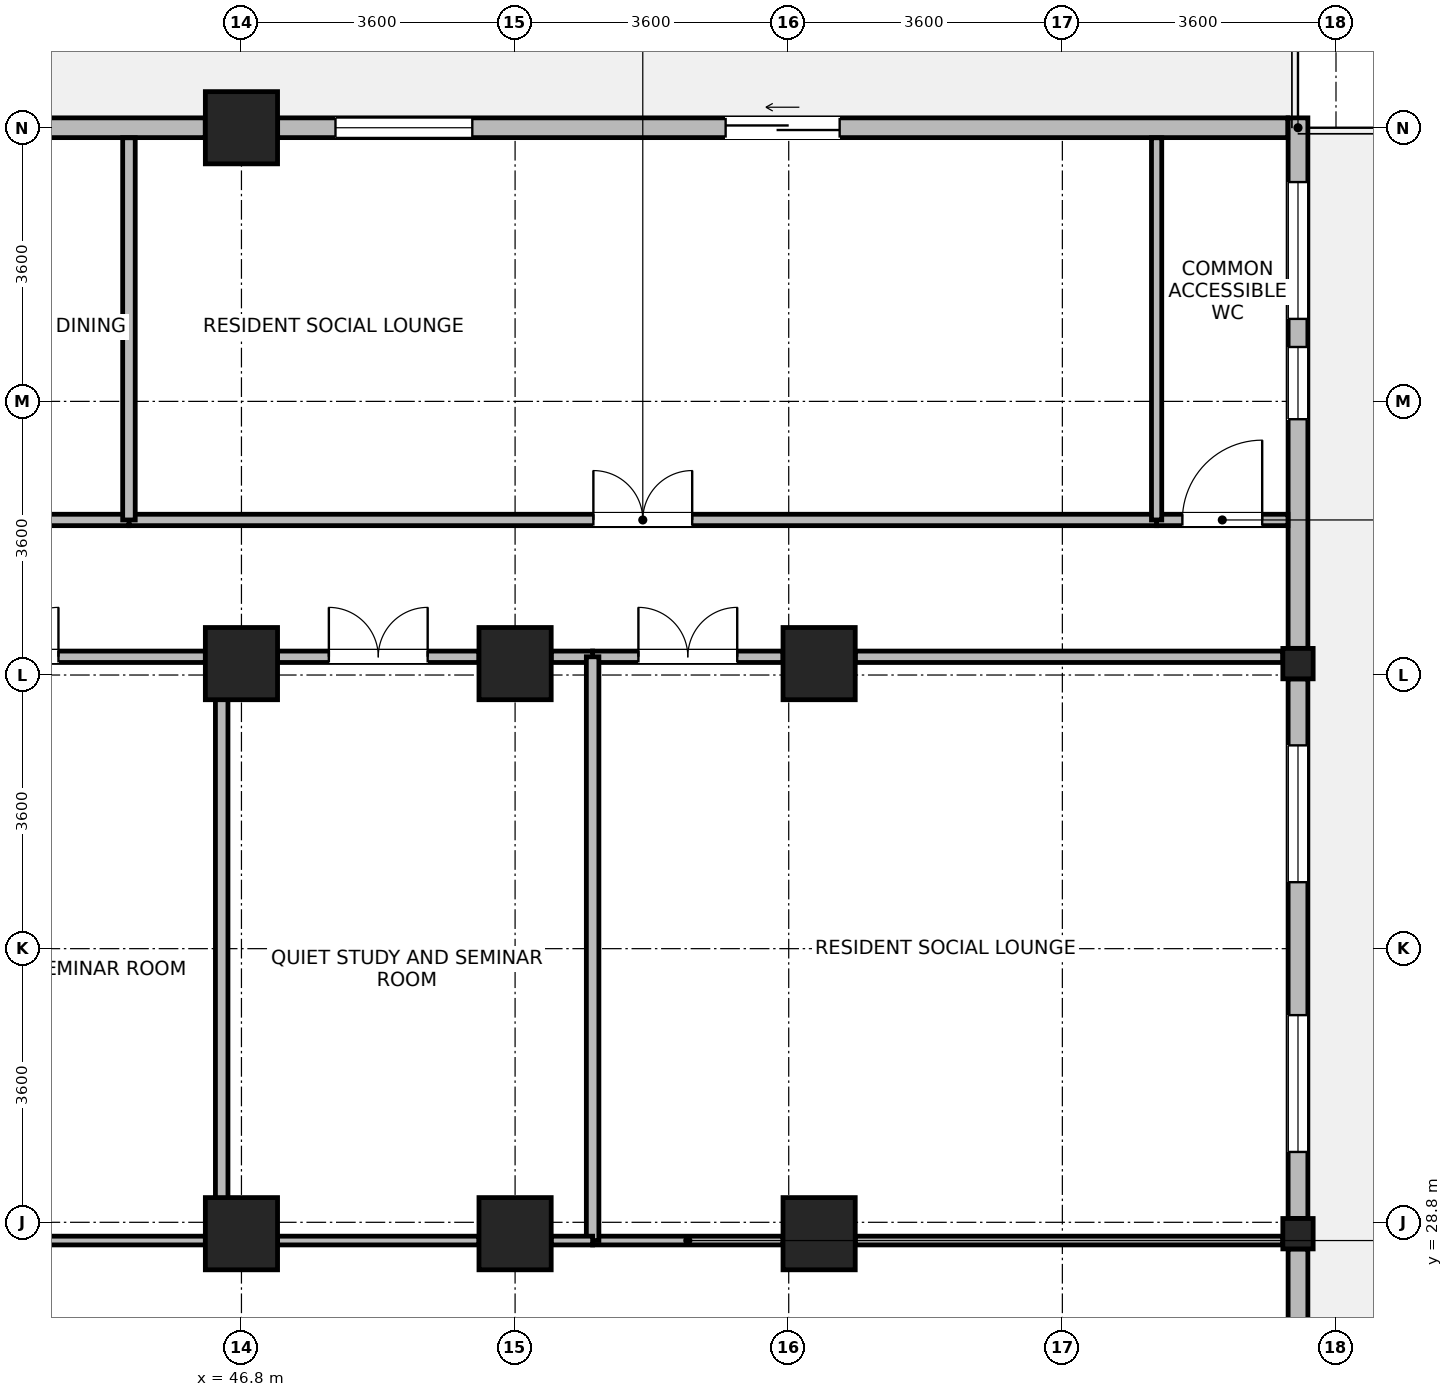
"""IFC4 building model, lengths in metres.
Left out: names, types, materials, properties, quantities, classifications, styles, units other than length and angle.
Written with IfcOpenShell. Run it as: python <this file> out.ifc"""

import sys

from ifc_helpers import new_model, si_unit, direction, frame, frame_2d, origin, origin_2d, place, context, subcontext, project, spatial, rectangle, i_section, extrude, source, transform, mapped, element, fill, save


model = new_model("IFC4")
c1 = context("Model", 3, precision=1e-05, world=origin(), true_north=direction((0.0, 1.0)))
c2 = subcontext(c1, "Body", "Model", "MODEL_VIEW")
j1 = project(units=[si_unit("LENGTHUNIT", "METRE"), si_unit("PLANEANGLEUNIT", "RADIAN")], contexts=[c1])
p1 = place(None, origin())
s1 = spatial("IfcSite", under=j1, at=p1, CompositionType="ELEMENT")
p2 = place(p1, origin())
s2 = spatial("IfcBuilding", under=s1, at=p2, CompositionType="ELEMENT")
p3 = place(p2, frame((0.0, 0.0, 212.9)))
s3 = spatial("IfcBuildingStorey", under=s2, at=p3, CompositionType="ELEMENT", Elevation=212.9)
m1 = source(origin(), c2, "Body", "SweptSolid", [
    extrude(rectangle(XDim=0.95, YDim=0.95, at=origin_2d()), origin(), (0.0, 0.0, 1.0), 3.7),
])
for number, where, z_axis, x_axis in (
    (1, (46.8, 28.65, 0.0), (0.0, 0.0, 1.0), (1.0, 0.0, 0.0)),
    (2, (46.8, 36.15, 0.0), (0.0, 0.0, 1.0), (1.0, 0.0, 0.0)),
    (3, (46.8, 43.2, 0.0), (0.0, 0.0, 1.0), (1.0, 0.0, 0.0)),
    (4, (50.4, 28.65, 0.0), (0.0, 0.0, 1.0), (1.0, 0.0, 0.0)),
    (5, (50.4, 36.15, 0.0), (0.0, 0.0, 1.0), (1.0, 0.0, 0.0)),
    (6, (54.4, 28.65, 0.0), (0.0, 0.0, 1.0), (1.0, 0.0, 0.0)),
    (7, (54.4, 36.15, 0.0), (0.0, 0.0, 1.0), (1.0, 0.0, 0.0)),
):
    element("IfcColumn", number, at=place(p3, frame(where, z_axis=z_axis, x_axis=x_axis)), inside=s3, PredefinedType="COLUMN", context=c2, shape_type="MappedRepresentation", body=[
        mapped(m1, transform((0.0, 0.0, 0.0), x_axis=(1.0, 0.0, 0.0), y_axis=(0.0, 1.0, 0.0), z_axis=(0.0, 0.0, 1.0), scale=1.0)),
    ])
m2 = source(origin(), c2, "Body", "SweptSolid", [
    extrude(i_section(OverallWidth=0.399, OverallDepth=0.4, WebThickness=0.017, FlangeThickness=0.023, FilletRadius=0.015, at=origin_2d()), origin(), (0.0, 0.0, 1.0), 3.7),
])
for number, where, z_axis, x_axis in (
    (8, (60.7, 28.65, 0.0), (0.0, 0.0, 1.0), (1.0, 0.0, 0.0)),
    (9, (60.7, 36.15, 0.0), (0.0, 0.0, 1.0), (1.0, 0.0, 0.0)),
):
    element("IfcColumn", number, at=place(p3, frame(where, z_axis=z_axis, x_axis=x_axis)), inside=s3, PredefinedType="COLUMN", context=c2, shape_type="MappedRepresentation", body=[
        mapped(m2, transform((0.0, 0.0, 0.0), x_axis=(1.0, 0.0, 0.0), y_axis=(0.0, 1.0, 0.0), z_axis=(0.0, 0.0, 1.0), scale=1.0)),
    ])
p4 = place(p3, frame((60.7, 28.449, 0.0), z_axis=(0.0, 0.0, 1.0), x_axis=(0.0, -1.0, 0.0)))
e10 = element("IfcWall", 10, at=p4, inside=s3, PredefinedType="STANDARD", context=c2, shape_type="SweptSolid", body=[
    extrude(rectangle(XDim=6.648, YDim=0.26, at=frame_2d((3.324, 0.0))), origin(), (0.0, 0.0, 1.0), 3.05),
])
p5 = place(p4, frame((4.086, 0.0, 0.85)))
e11 = element("IfcOpeningElement", 11, at=p5, cuts=e10, PredefinedType="OPENING", context=c2, shape_type="SweptSolid", body=[
    extrude(rectangle(XDim=1.8, YDim=1.85, at=frame_2d((0.9, 0.925))), frame((0.0, 0.14, 0.0), z_axis=(0.0, -1.0, 0.0), x_axis=(1.0, 0.0, 0.0)), (0.0, 0.0, 1.0), 0.28),
])
p6 = place(p4, frame((2.317, 0.0, 0.85)))
e12 = element("IfcOpeningElement", 12, at=p6, cuts=e10, PredefinedType="OPENING", context=c2, shape_type="SweptSolid", body=[
    extrude(rectangle(XDim=0.95, YDim=1.75, at=frame_2d((0.475, 0.875))), frame((0.0, 0.14, 0.0), z_axis=(0.0, -1.0, 0.0), x_axis=(1.0, 0.0, 0.0)), (0.0, 0.0, 1.0), 0.28),
])
p7 = place(p3, frame((60.7, 35.949, 0.0), z_axis=(0.0, 0.0, 1.0), x_axis=(0.0, -1.0, 0.0)))
e13 = element("IfcWall", 13, at=p7, inside=s3, PredefinedType="STANDARD", context=c2, shape_type="SweptSolid", body=[
    extrude(rectangle(XDim=7.098, YDim=0.26, at=frame_2d((3.549, 0.0))), origin(), (0.0, 0.0, 1.0), 3.05),
])
p8 = place(p7, frame((0.875, 0.0, 0.85)))
e14 = element("IfcOpeningElement", 14, at=p8, cuts=e13, PredefinedType="OPENING", context=c2, shape_type="SweptSolid", body=[
    extrude(rectangle(XDim=1.8, YDim=1.85, at=frame_2d((0.9, 0.925))), frame((0.0, 0.14, 0.0), z_axis=(0.0, -1.0, 0.0), x_axis=(1.0, 0.0, 0.0)), (0.0, 0.0, 1.0), 0.28),
])
p9 = place(p7, frame((4.424, 0.0, 0.85)))
e15 = element("IfcOpeningElement", 15, at=p9, cuts=e13, PredefinedType="OPENING", context=c2, shape_type="SweptSolid", body=[
    extrude(rectangle(XDim=1.8, YDim=1.85, at=frame_2d((0.9, 0.925))), frame((0.0, 0.14, 0.0), z_axis=(0.0, -1.0, 0.0), x_axis=(1.0, 0.0, 0.0)), (0.0, 0.0, 1.0), 0.28),
])
p10 = place(p3, frame((60.7, 43.33, 0.0), z_axis=(0.0, 0.0, 1.0), x_axis=(0.0, -1.0, 0.0)))
e16 = element("IfcWall", 16, at=p10, inside=s3, PredefinedType="STANDARD", context=c2, shape_type="SweptSolid", body=[
    extrude(rectangle(XDim=6.979, YDim=0.26, at=frame_2d((3.49, 0.0))), origin(), (0.0, 0.0, 1.0), 3.45),
])
p11 = place(p10, frame((0.845, 0.0, 0.85)))
e17 = element("IfcOpeningElement", 17, at=p11, cuts=e16, PredefinedType="OPENING", context=c2, shape_type="SweptSolid", body=[
    extrude(rectangle(XDim=1.8, YDim=1.85, at=frame_2d((0.9, 0.925))), frame((0.0, 0.14, 0.0), z_axis=(0.0, -1.0, 0.0), x_axis=(1.0, 0.0, 0.0)), (0.0, 0.0, 1.0), 0.28),
])
p12 = place(p10, frame((3.014, 0.0, 0.85)))
e18 = element("IfcOpeningElement", 18, at=p12, cuts=e16, PredefinedType="OPENING", context=c2, shape_type="SweptSolid", body=[
    extrude(rectangle(XDim=0.95, YDim=1.75, at=frame_2d((0.475, 0.875))), frame((0.0, 0.14, 0.0), z_axis=(0.0, -1.0, 0.0), x_axis=(1.0, 0.0, 0.0)), (0.0, 0.0, 1.0), 0.28),
])
p13 = place(p3, frame((47.276, 43.2, 0.0), z_axis=(0.0, 0.0, 1.0), x_axis=(1.0, 0.0, 0.0)))
e19 = element("IfcWall", 19, at=p13, inside=s3, PredefinedType="STANDARD", context=c2, shape_type="SweptSolid", body=[
    extrude(rectangle(XDim=13.289, YDim=0.26, at=frame_2d((6.645, 0.0))), origin(), (0.0, 0.0, 1.0), 3.45),
])
p14 = place(p13, frame((5.894, 0.0, 0.0)))
e20 = element("IfcOpeningElement", 20, at=p14, cuts=e19, PredefinedType="OPENING", context=c2, shape_type="SweptSolid", body=[
    extrude(rectangle(XDim=1.5, YDim=2.15, at=frame_2d((0.75, 1.075))), frame((0.0, 0.14, 0.0), z_axis=(0.0, -1.0, 0.0), x_axis=(1.0, 0.0, 0.0)), (0.0, 0.0, 1.0), 0.28),
])
p15 = place(p13, frame((0.761, 0.0, 0.85)))
e21 = element("IfcOpeningElement", 21, at=p15, cuts=e19, PredefinedType="OPENING", context=c2, shape_type="SweptSolid", body=[
    extrude(rectangle(XDim=1.8, YDim=1.85, at=frame_2d((0.9, 0.925))), frame((0.0, 0.14, 0.0), z_axis=(0.0, -1.0, 0.0), x_axis=(1.0, 0.0, 0.0)), (0.0, 0.0, 1.0), 0.28),
])
p16 = place(p3, frame((36.476, 43.2, 0.0), z_axis=(0.0, 0.0, 1.0), x_axis=(1.0, 0.0, 0.0)))
e22 = element("IfcWall", 22, at=p16, inside=s3, PredefinedType="STANDARD", context=c2, shape_type="SweptSolid", body=[
    extrude(rectangle(XDim=9.848, YDim=0.26, at=frame_2d((4.924, 0.0))), origin(), (0.0, 0.0, 1.0), 3.05),
])
p17 = place(p16, frame((0.741, 0.0, 0.85)))
e23 = element("IfcOpeningElement", 23, at=p17, cuts=e22, PredefinedType="OPENING", context=c2, shape_type="SweptSolid", body=[
    extrude(rectangle(XDim=1.8, YDim=1.85, at=frame_2d((0.9, 0.925))), frame((0.0, 0.14, 0.0), z_axis=(0.0, -1.0, 0.0), x_axis=(1.0, 0.0, 0.0)), (0.0, 0.0, 1.0), 0.28),
])
p18 = place(p16, frame((4.024, 0.0, 0.85)))
e24 = element("IfcOpeningElement", 24, at=p18, cuts=e22, PredefinedType="OPENING", context=c2, shape_type="SweptSolid", body=[
    extrude(rectangle(XDim=1.8, YDim=1.85, at=frame_2d((0.9, 0.925))), frame((0.0, 0.14, 0.0), z_axis=(0.0, -1.0, 0.0), x_axis=(1.0, 0.0, 0.0)), (0.0, 0.0, 1.0), 0.28),
])
p19 = place(p3, frame((45.32, 38.04, 0.0), z_axis=(0.0, 0.0, 1.0), x_axis=(1.0, 0.0, 0.0)))
e25 = element("IfcWall", 25, at=p19, inside=s3, PredefinedType="PARTITIONING", context=c2, shape_type="SweptSolid", body=[
    extrude(rectangle(XDim=13.52, YDim=0.15, at=frame_2d((6.76, 0.0))), origin(), (0.0, 0.0, 1.0), 3.45),
])
p20 = place(p19, frame((6.11, 0.0, 0.0)))
e26 = element("IfcOpeningElement", 26, at=p20, cuts=e25, PredefinedType="OPENING", context=c2, shape_type="SweptSolid", body=[
    extrude(rectangle(XDim=1.3, YDim=2.12, at=frame_2d((0.65, 1.06))), frame((0.0, 0.085, 0.0), z_axis=(0.0, -1.0, 0.0), x_axis=(1.0, 0.0, 0.0)), (0.0, 0.0, 1.0), 0.17),
])
p21 = place(p3, frame((33.64, 38.04, 0.0), z_axis=(0.0, 0.0, 1.0), x_axis=(1.0, 0.0, 0.0)))
e27 = element("IfcWall", 27, at=p21, inside=s3, PredefinedType="PARTITIONING", context=c2, shape_type="SweptSolid", body=[
    extrude(rectangle(XDim=11.68, YDim=0.15, at=frame_2d((5.84, 0.0))), origin(), (0.0, 0.0, 1.0), 3.45),
])
p22 = place(p21, frame((5.39, 0.0, 0.0)))
e28 = element("IfcOpeningElement", 28, at=p22, cuts=e27, PredefinedType="OPENING", context=c2, shape_type="SweptSolid", body=[
    extrude(rectangle(XDim=0.9, YDim=2.08, at=frame_2d((0.45, 1.04))), frame((0.0, 0.085, 0.0), z_axis=(0.0, -1.0, 0.0), x_axis=(1.0, 0.0, 0.0)), (0.0, 0.0, 1.0), 0.17),
])
p23 = place(p3, frame((51.42, 36.24, 0.0), z_axis=(0.0, 0.0, 1.0), x_axis=(1.0, 0.0, 0.0)))
e29 = element("IfcWall", 29, at=p23, inside=s3, PredefinedType="PARTITIONING", context=c2, shape_type="SweptSolid", body=[
    extrude(rectangle(XDim=2.505, YDim=0.15, at=frame_2d((1.252, 0.0))), origin(), (0.0, 0.0, 1.0), 2.9),
])
p24 = place(p23, frame((0.603, 0.0, 0.0)))
e30 = element("IfcOpeningElement", 30, at=p24, cuts=e29, PredefinedType="OPENING", context=c2, shape_type="SweptSolid", body=[
    extrude(rectangle(XDim=1.3, YDim=2.12, at=frame_2d((0.65, 1.06))), frame((0.0, 0.085, 0.0), z_axis=(0.0, -1.0, 0.0), x_axis=(1.0, 0.0, 0.0)), (0.0, 0.0, 1.0), 0.17),
])
p25 = place(p3, frame((54.875, 36.24, 0.0), z_axis=(0.0, 0.0, 1.0), x_axis=(1.0, 0.0, 0.0)))
e31 = element("IfcWall", 31, at=p25, inside=s3, PredefinedType="PARTITIONING", context=c2, shape_type="SweptSolid", body=[
    extrude(rectangle(XDim=5.625, YDim=0.15, at=frame_2d((2.813, 0.0))), origin(), (0.0, 0.0, 1.0), 2.9),
])
p26 = place(p3, frame((41.16, 36.24, 0.0), z_axis=(0.0, 0.0, 1.0), x_axis=(1.0, 0.0, 0.0)))
e32 = element("IfcWall", 32, at=p26, inside=s3, PredefinedType="PARTITIONING", context=c2, shape_type="SweptSolid", body=[
    extrude(rectangle(XDim=5.165, YDim=0.15, at=frame_2d((2.583, 0.0))), origin(), (0.0, 0.0, 1.0), 2.9),
])
p27 = place(p26, frame((1.933, 0.0, 0.0)))
e33 = element("IfcOpeningElement", 33, at=p27, cuts=e32, PredefinedType="OPENING", context=c2, shape_type="SweptSolid", body=[
    extrude(rectangle(XDim=1.3, YDim=2.12, at=frame_2d((0.65, 1.06))), frame((0.0, 0.085, 0.0), z_axis=(0.0, -1.0, 0.0), x_axis=(1.0, 0.0, 0.0)), (0.0, 0.0, 1.0), 0.17),
])
p28 = place(p3, frame((47.275, 36.24, 0.0), z_axis=(0.0, 0.0, 1.0), x_axis=(1.0, 0.0, 0.0)))
e34 = element("IfcWall", 34, at=p28, inside=s3, PredefinedType="PARTITIONING", context=c2, shape_type="SweptSolid", body=[
    extrude(rectangle(XDim=2.65, YDim=0.15, at=frame_2d((1.325, 0.0))), origin(), (0.0, 0.0, 1.0), 2.9),
])
p29 = place(p28, frame((0.675, 0.0, 0.0)))
e35 = element("IfcOpeningElement", 35, at=p29, cuts=e34, PredefinedType="OPENING", context=c2, shape_type="SweptSolid", body=[
    extrude(rectangle(XDim=1.3, YDim=2.12, at=frame_2d((0.65, 1.06))), frame((0.0, 0.085, 0.0), z_axis=(0.0, -1.0, 0.0), x_axis=(1.0, 0.0, 0.0)), (0.0, 0.0, 1.0), 0.17),
])
p30 = place(p3, frame((50.875, 36.24, 0.0), z_axis=(0.0, 0.0, 1.0), x_axis=(1.0, 0.0, 0.0)))
e36 = element("IfcWall", 36, at=p30, inside=s3, PredefinedType="PARTITIONING", context=c2, shape_type="SweptSolid", body=[
    extrude(rectangle(XDim=0.545, YDim=0.15, at=frame_2d((0.272, 0.0))), origin(), (0.0, 0.0, 1.0), 2.9),
])
p31 = place(p3, frame((58.84, 38.04, 0.0), z_axis=(0.0, 0.0, 1.0), x_axis=(1.0, 0.0, 0.0)))
e37 = element("IfcWall", 37, at=p31, inside=s3, PredefinedType="PARTITIONING", context=c2, shape_type="SweptSolid", body=[
    extrude(rectangle(XDim=1.728, YDim=0.15, at=frame_2d((0.864, 0.0))), origin(), (0.0, 0.0, 1.0), 3.45),
])
p32 = place(p31, frame((0.339, 0.0, 0.0)))
e38 = element("IfcOpeningElement", 38, at=p32, cuts=e37, PredefinedType="OPENING", context=c2, shape_type="SweptSolid", body=[
    extrude(rectangle(XDim=1.05, YDim=2.12, at=frame_2d((0.525, 1.06))), frame((0.0, 0.085, 0.0), z_axis=(0.0, -1.0, 0.0), x_axis=(1.0, 0.0, 0.0)), (0.0, 0.0, 1.0), 0.17),
])
p33 = place(p3, frame((51.42, 28.56, 0.0), z_axis=(0.0, 0.0, 1.0), x_axis=(1.0, 0.0, 0.0)))
e39 = element("IfcWall", 39, at=p33, inside=s3, PredefinedType="PARTITIONING", context=c2, shape_type="SweptSolid", body=[
    extrude(rectangle(XDim=2.505, YDim=0.115, at=frame_2d((1.252, 0.0))), origin(), (0.0, 0.0, 1.0), 2.9),
])
p34 = place(p3, frame((54.875, 28.56, 0.0), z_axis=(0.0, 0.0, 1.0), x_axis=(1.0, 0.0, 0.0)))
e40 = element("IfcWall", 40, at=p34, inside=s3, PredefinedType="PARTITIONING", context=c2, shape_type="SweptSolid", body=[
    extrude(rectangle(XDim=5.625, YDim=0.115, at=frame_2d((2.813, 0.0))), origin(), (0.0, 0.0, 1.0), 2.9),
])
for number, where, z_axis, x_axis in (
    (41, (46.54, 28.56, 0.0), (0.0, 0.0, 1.0), (0.0, 1.0, 0.0)),
    (42, (51.42, 28.56, 0.0), (0.0, 0.0, 1.0), (0.0, 1.0, 0.0)),
):
    element("IfcWall", number, at=place(p3, frame(where, z_axis=z_axis, x_axis=x_axis)), inside=s3, PredefinedType="PARTITIONING", context=c2, shape_type="SweptSolid", body=[
        extrude(rectangle(XDim=7.68, YDim=0.165, at=frame_2d((3.84, 0.0))), origin(), (0.0, 0.0, 1.0), 3.45),
    ])
p35 = place(p3, frame((41.16, 28.56, 0.0), z_axis=(0.0, 0.0, 1.0), x_axis=(1.0, 0.0, 0.0)))
e43 = element("IfcWall", 43, at=p35, inside=s3, PredefinedType="PARTITIONING", context=c2, shape_type="SweptSolid", body=[
    extrude(rectangle(XDim=5.165, YDim=0.115, at=frame_2d((2.583, 0.0))), origin(), (0.0, 0.0, 1.0), 2.9),
])
p36 = place(p3, frame((45.32, 38.04, 0.0), z_axis=(0.0, 0.0, 1.0), x_axis=(0.0, 1.0, 0.0)))
e44 = element("IfcWall", 44, at=p36, inside=s3, PredefinedType="PARTITIONING", context=c2, shape_type="SweptSolid", body=[
    extrude(rectangle(XDim=5.028, YDim=0.165, at=frame_2d((2.514, 0.0))), origin(), (0.0, 0.0, 1.0), 3.45),
])
p37 = place(p3, frame((58.84, 38.04, 0.0), z_axis=(0.0, 0.0, 1.0), x_axis=(0.0, 1.0, 0.0)))
e45 = element("IfcWall", 45, at=p37, inside=s3, PredefinedType="PARTITIONING", context=c2, shape_type="SweptSolid", body=[
    extrude(rectangle(XDim=5.028, YDim=0.135, at=frame_2d((2.514, 0.0))), origin(), (0.0, 0.0, 1.0), 3.45),
])
p38 = place(p3, frame((47.275, 28.56, 0.0), z_axis=(0.0, 0.0, 1.0), x_axis=(1.0, 0.0, 0.0)))
e46 = element("IfcWall", 46, at=p38, inside=s3, PredefinedType="PARTITIONING", context=c2, shape_type="SweptSolid", body=[
    extrude(rectangle(XDim=2.65, YDim=0.115, at=frame_2d((1.325, 0.0))), origin(), (0.0, 0.0, 1.0), 2.9),
])
p39 = place(p3, frame((50.875, 28.56, 0.0), z_axis=(0.0, 0.0, 1.0), x_axis=(1.0, 0.0, 0.0)))
e47 = element("IfcWall", 47, at=p39, inside=s3, PredefinedType="PARTITIONING", context=c2, shape_type="SweptSolid", body=[
    extrude(rectangle(XDim=0.545, YDim=0.115, at=frame_2d((0.272, 0.0))), origin(), (0.0, 0.0, 1.0), 2.9),
])
p40 = place(p8, origin())
e48 = element("IfcWindow", 48, at=p40, inside=s3, PartitioningType="SINGLE_PANEL", PredefinedType="WINDOW", context=c2, shape_type="SweptSolid", body=[
    extrude(rectangle(XDim=1.8, YDim=1.85, at=frame_2d((0.9, 0.925))), frame((0.0, 0.03, 0.0), z_axis=(0.0, -1.0, 0.0), x_axis=(1.0, 0.0, 0.0)), (0.0, 0.0, 1.0), 0.06),
])
fill(e14, e48)
p41 = place(p9, origin())
e49 = element("IfcWindow", 49, at=p41, inside=s3, PartitioningType="SINGLE_PANEL", PredefinedType="WINDOW", context=c2, shape_type="SweptSolid", body=[
    extrude(rectangle(XDim=1.8, YDim=1.85, at=frame_2d((0.9, 0.925))), frame((0.0, 0.03, 0.0), z_axis=(0.0, -1.0, 0.0), x_axis=(1.0, 0.0, 0.0)), (0.0, 0.0, 1.0), 0.06),
])
fill(e15, e49)
p42 = place(p11, origin())
e50 = element("IfcWindow", 50, at=p42, inside=s3, PartitioningType="SINGLE_PANEL", PredefinedType="WINDOW", context=c2, shape_type="SweptSolid", body=[
    extrude(rectangle(XDim=1.8, YDim=1.85, at=frame_2d((0.9, 0.925))), frame((0.0, 0.03, 0.0), z_axis=(0.0, -1.0, 0.0), x_axis=(1.0, 0.0, 0.0)), (0.0, 0.0, 1.0), 0.06),
])
fill(e17, e50)
p43 = place(p12, origin())
e51 = element("IfcWindow", 51, at=p43, inside=s3, PartitioningType="SINGLE_PANEL", PredefinedType="WINDOW", context=c2, shape_type="SweptSolid", body=[
    extrude(rectangle(XDim=0.95, YDim=1.75, at=frame_2d((0.475, 0.875))), frame((0.0, 0.03, 0.0), z_axis=(0.0, -1.0, 0.0), x_axis=(1.0, 0.0, 0.0)), (0.0, 0.0, 1.0), 0.06),
])
fill(e18, e51)
p44 = place(p14, origin())
e52 = element("IfcDoor", 52, at=p44, inside=s3, OperationType="SLIDING_TO_LEFT", PredefinedType="DOOR", context=c2, shape_type="SweptSolid", body=[
    extrude(rectangle(XDim=1.5, YDim=2.15, at=frame_2d((0.75, 1.075))), frame((0.0, 0.025, 0.0), z_axis=(0.0, -1.0, 0.0), x_axis=(1.0, 0.0, 0.0)), (0.0, 0.0, 1.0), 0.05),
])
fill(e20, e52)
p45 = place(p15, origin())
e53 = element("IfcWindow", 53, at=p45, inside=s3, PartitioningType="SINGLE_PANEL", PredefinedType="WINDOW", context=c2, shape_type="SweptSolid", body=[
    extrude(rectangle(XDim=1.8, YDim=1.85, at=frame_2d((0.9, 0.925))), frame((0.0, 0.03, 0.0), z_axis=(0.0, -1.0, 0.0), x_axis=(1.0, 0.0, 0.0)), (0.0, 0.0, 1.0), 0.06),
])
fill(e21, e53)
p46 = place(p20, origin())
e54 = element("IfcDoor", 54, at=p46, inside=s3, OperationType="DOUBLE_DOOR_SINGLE_SWING", PredefinedType="DOOR", context=c2, shape_type="SweptSolid", body=[
    extrude(rectangle(XDim=1.3, YDim=2.12, at=frame_2d((0.65, 1.06))), frame((0.0, 0.025, 0.0), z_axis=(0.0, -1.0, 0.0), x_axis=(1.0, 0.0, 0.0)), (0.0, 0.0, 1.0), 0.05),
])
fill(e26, e54)
p47 = place(p24, origin())
e55 = element("IfcDoor", 55, at=p47, inside=s3, OperationType="DOUBLE_DOOR_SINGLE_SWING", PredefinedType="DOOR", context=c2, shape_type="SweptSolid", body=[
    extrude(rectangle(XDim=1.3, YDim=2.12, at=frame_2d((0.65, 1.06))), frame((0.0, 0.025, 0.0), z_axis=(0.0, -1.0, 0.0), x_axis=(1.0, 0.0, 0.0)), (0.0, 0.0, 1.0), 0.05),
])
fill(e30, e55)
p48 = place(p27, origin())
e56 = element("IfcDoor", 56, at=p48, inside=s3, OperationType="DOUBLE_DOOR_SINGLE_SWING", PredefinedType="DOOR", context=c2, shape_type="SweptSolid", body=[
    extrude(rectangle(XDim=1.3, YDim=2.12, at=frame_2d((0.65, 1.06))), frame((0.0, 0.025, 0.0), z_axis=(0.0, -1.0, 0.0), x_axis=(1.0, 0.0, 0.0)), (0.0, 0.0, 1.0), 0.05),
])
fill(e33, e56)
p49 = place(p29, origin())
e57 = element("IfcDoor", 57, at=p49, inside=s3, OperationType="DOUBLE_DOOR_SINGLE_SWING", PredefinedType="DOOR", context=c2, shape_type="SweptSolid", body=[
    extrude(rectangle(XDim=1.3, YDim=2.12, at=frame_2d((0.65, 1.06))), frame((0.0, 0.025, 0.0), z_axis=(0.0, -1.0, 0.0), x_axis=(1.0, 0.0, 0.0)), (0.0, 0.0, 1.0), 0.05),
])
fill(e35, e57)
p50 = place(p32, origin())
e58 = element("IfcDoor", 58, at=p50, inside=s3, OperationType="SINGLE_SWING_RIGHT", PredefinedType="DOOR", context=c2, shape_type="SweptSolid", body=[
    extrude(rectangle(XDim=1.05, YDim=2.12, at=frame_2d((0.525, 1.06))), frame((0.0, 0.025, 0.0), z_axis=(0.0, -1.0, 0.0), x_axis=(1.0, 0.0, 0.0)), (0.0, 0.0, 1.0), 0.05),
])
fill(e38, e58)
save(model, sys.argv[1])
